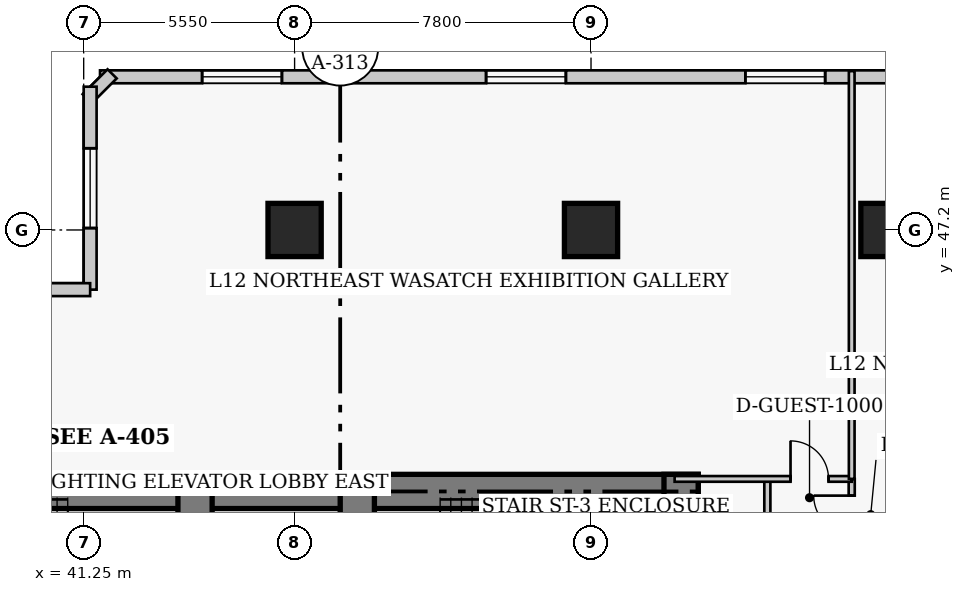
"""IFC4 building model, lengths in metres.
Left out: names, types, materials, properties, quantities, classifications, styles, units other than length and angle.
Written with IfcOpenShell. Run it as: python <this file> out.ifc"""

import sys

from ifc_helpers import new_model, si_unit, direction, frame, frame_2d, origin, origin_2d, place, context, subcontext, project, spatial, rectangle, extrude, element, fill, save


model = new_model("IFC4")
c1 = context("Model", 3, precision=1e-05, world=origin(), true_north=direction((0.0, 1.0)))
c2 = subcontext(c1, "Body", "Model", "MODEL_VIEW")
j1 = project(units=[si_unit("LENGTHUNIT", "METRE"), si_unit("PLANEANGLEUNIT", "RADIAN")], contexts=[c1])
p1 = place(None, origin())
s1 = spatial("IfcSite", under=j1, at=p1, CompositionType="ELEMENT")
p2 = place(p1, origin())
s2 = spatial("IfcBuilding", under=s1, at=p2, CompositionType="ELEMENT")
p3 = place(p2, frame((0.0, 0.0, 52.6)))
s3 = spatial("IfcBuildingStorey", under=s2, at=p3, CompositionType="ELEMENT", Elevation=52.6)
p4 = place(p3, frame((35.85, 40.32, 0.0), z_axis=(0.0, 0.0, 1.0), x_axis=(1.0, 0.0, 0.0)))
e1 = element("IfcWall", 1, at=p4, inside=s3, PredefinedType="SHEAR", context=c2, shape_type="SweptSolid", body=[
    extrude(rectangle(XDim=12.6, YDim=0.9, at=frame_2d((6.3, 0.0))), origin(), (0.0, 0.0, 1.0), 3.8),
])
p5 = place(p3, frame((48.45, 40.32, 0.0), z_axis=(0.0, 0.0, 1.0), x_axis=(1.0, 0.0, 0.0)))
e2 = element("IfcWall", 2, at=p5, inside=s3, PredefinedType="SHEAR", context=c2, shape_type="SweptSolid", body=[
    extrude(rectangle(XDim=8.97, YDim=0.9, at=frame_2d((4.485, 0.0))), origin(), (0.0, 0.0, 1.0), 3.8),
])
p6 = place(p3, frame((56.97, 27.05, 0.0), z_axis=(0.0, 0.0, 1.0), x_axis=(0.0, 1.0, 0.0)))
e3 = element("IfcWall", 3, at=p6, inside=s3, PredefinedType="SHEAR", context=c2, shape_type="SweptSolid", body=[
    extrude(rectangle(XDim=13.72, YDim=0.9, at=frame_2d((6.86, 0.0))), origin(), (0.0, 0.0, 1.0), 3.8),
])
p7 = place(p3, frame((44.18, 36.37, 0.0), z_axis=(0.0, 0.0, 1.0), x_axis=(0.0, 1.0, 0.0)))
e4 = element("IfcWall", 4, at=p7, inside=s3, PredefinedType="SHEAR", context=c2, shape_type="SweptSolid", body=[
    extrude(rectangle(XDim=3.95, YDim=0.9, at=frame_2d((1.975, 0.0))), origin(), (0.0, 0.0, 1.0), 3.8),
])
p8 = place(p3, frame((48.45, 32.3, 0.0), z_axis=(0.0, 0.0, 1.0), x_axis=(0.0, 1.0, 0.0)))
e5 = element("IfcWall", 5, at=p8, inside=s3, PredefinedType="SHEAR", context=c2, shape_type="SweptSolid", body=[
    extrude(rectangle(XDim=8.02, YDim=0.9, at=frame_2d((4.01, 0.0))), origin(), (0.0, 0.0, 1.0), 3.8),
])
p9 = place(p8, frame((5.9, 0.0, 0.0)))
e6 = element("IfcOpeningElement", 6, at=p9, cuts=e5, PredefinedType="OPENING", context=c2, shape_type="SweptSolid", body=[
    extrude(rectangle(XDim=1.1, YDim=2.15, at=frame_2d((0.55, 1.075))), frame((0.0, 0.46, 0.0), z_axis=(0.0, -1.0, 0.0), x_axis=(1.0, 0.0, 0.0)), (0.0, 0.0, 1.0), 0.92),
])
for number, where, z_axis, x_axis in (
    (7, (46.8, 47.2, 0.0), (0.0, 0.0, 1.0), (1.0, 0.0, 0.0)),
    (8, (54.6, 47.2, 0.0), (0.0, 0.0, 1.0), (1.0, 0.0, 0.0)),
    (9, (62.4, 47.2, 0.0), (0.0, 0.0, 1.0), (1.0, 0.0, 0.0)),
):
    element("IfcColumn", number, at=place(p3, frame(where, z_axis=z_axis, x_axis=x_axis)), inside=s3, PredefinedType="COLUMN", context=c2, shape_type="SweptSolid", body=[
        extrude(rectangle(XDim=1.4, YDim=1.4, at=origin_2d()), origin(), (0.0, 0.0, 1.0), 3.8),
    ])
p10 = place(p3, frame((71.57, 51.23, 0.0), z_axis=(0.0, 0.0, 1.0), x_axis=(-1.0, 0.0, 0.0)))
e10 = element("IfcWall", 10, at=p10, inside=s3, PredefinedType="SOLIDWALL", context=c2, shape_type="SweptSolid", body=[
    extrude(rectangle(XDim=29.89, YDim=0.34, at=frame_2d((14.945, 0.0))), origin(), (0.0, 0.0, 1.0), 3.54),
])
p11 = place(p10, frame((2.686, 0.0, 0.85)))
e11 = element("IfcOpeningElement", 11, at=p11, cuts=e10, PredefinedType="OPENING", context=c2, shape_type="SweptSolid", body=[
    extrude(rectangle(XDim=2.1, YDim=1.85, at=frame_2d((1.05, 0.925))), frame((0.0, 0.18, 0.0), z_axis=(0.0, -1.0, 0.0), x_axis=(1.0, 0.0, 0.0)), (0.0, 0.0, 1.0), 0.36),
])
p12 = place(p10, frame((10.809, 0.0, 0.85)))
e12 = element("IfcOpeningElement", 12, at=p12, cuts=e10, PredefinedType="OPENING", context=c2, shape_type="SweptSolid", body=[
    extrude(rectangle(XDim=2.1, YDim=1.85, at=frame_2d((1.05, 0.925))), frame((0.0, 0.18, 0.0), z_axis=(0.0, -1.0, 0.0), x_axis=(1.0, 0.0, 0.0)), (0.0, 0.0, 1.0), 0.36),
])
p13 = place(p10, frame((17.631, 0.0, 0.85)))
e13 = element("IfcOpeningElement", 13, at=p13, cuts=e10, PredefinedType="OPENING", context=c2, shape_type="SweptSolid", body=[
    extrude(rectangle(XDim=2.1, YDim=1.85, at=frame_2d((1.05, 0.925))), frame((0.0, 0.18, 0.0), z_axis=(0.0, -1.0, 0.0), x_axis=(1.0, 0.0, 0.0)), (0.0, 0.0, 1.0), 0.36),
])
p14 = place(p10, frame((25.104, 0.0, 0.85)))
e14 = element("IfcOpeningElement", 14, at=p14, cuts=e10, PredefinedType="OPENING", context=c2, shape_type="SweptSolid", body=[
    extrude(rectangle(XDim=2.1, YDim=1.85, at=frame_2d((1.05, 0.925))), frame((0.0, 0.18, 0.0), z_axis=(0.0, -1.0, 0.0), x_axis=(1.0, 0.0, 0.0)), (0.0, 0.0, 1.0), 0.36),
])
p15 = place(p3, frame((41.999, 51.308, 0.0), z_axis=(0.0, 0.0, 1.0), x_axis=(-0.707238225886, -0.706975312048, 0.0)))
e15 = element("IfcWall", 15, at=p15, inside=s3, PredefinedType="SOLIDWALL", context=c2, shape_type="SweptSolid", body=[
    extrude(rectangle(XDim=0.929, YDim=0.34, at=frame_2d((0.464, 0.0))), origin(), (0.0, 0.0, 1.0), 3.54),
])
p16 = place(p3, frame((41.42, 50.97, 0.0), z_axis=(0.0, 0.0, 1.0), x_axis=(0.0, -1.0, 0.0)))
e16 = element("IfcWall", 16, at=p16, inside=s3, PredefinedType="SOLIDWALL", context=c2, shape_type="SweptSolid", body=[
    extrude(rectangle(XDim=5.34, YDim=0.34, at=frame_2d((2.67, 0.0))), origin(), (0.0, 0.0, 1.0), 3.54),
])
p17 = place(p16, frame((1.62, 0.0, 0.85)))
e17 = element("IfcOpeningElement", 17, at=p17, cuts=e16, PredefinedType="OPENING", context=c2, shape_type="SweptSolid", body=[
    extrude(rectangle(XDim=2.1, YDim=1.85, at=frame_2d((1.05, 0.925))), frame((0.0, 0.18, 0.0), z_axis=(0.0, -1.0, 0.0), x_axis=(1.0, 0.0, 0.0)), (0.0, 0.0, 1.0), 0.36),
])
p18 = place(p3, frame((41.42, 45.63, 0.0), z_axis=(0.0, 0.0, 1.0), x_axis=(-1.0, 0.0, 0.0)))
e18 = element("IfcWall", 18, at=p18, inside=s3, PredefinedType="SOLIDWALL", context=c2, shape_type="SweptSolid", body=[
    extrude(rectangle(XDim=4.84, YDim=0.34, at=frame_2d((2.42, 0.0))), origin(), (0.0, 0.0, 1.0), 3.54),
])
p19 = place(p18, frame((1.37, 0.0, 0.85)))
e19 = element("IfcOpeningElement", 19, at=p19, cuts=e18, PredefinedType="OPENING", context=c2, shape_type="SweptSolid", body=[
    extrude(rectangle(XDim=2.1, YDim=1.85, at=frame_2d((1.05, 0.925))), frame((0.0, 0.18, 0.0), z_axis=(0.0, -1.0, 0.0), x_axis=(1.0, 0.0, 0.0)), (0.0, 0.0, 1.0), 0.36),
])
p20 = place(p3, frame((61.46, 10.25, 0.0), z_axis=(0.0, 0.0, 1.0), x_axis=(0.0, 1.0, 0.0)))
e20 = element("IfcWall", 20, at=p20, inside=s3, PredefinedType="PARTITIONING", context=c2, shape_type="SweptSolid", body=[
    extrude(rectangle(XDim=30.4, YDim=0.16, at=frame_2d((15.2, 0.0))), origin(), (0.0, 0.0, 1.0), 3.54),
])
p21 = place(p20, frame((4.4, 0.0, 0.0)))
e21 = element("IfcOpeningElement", 21, at=p21, cuts=e20, PredefinedType="OPENING", context=c2, shape_type="SweptSolid", body=[
    extrude(rectangle(XDim=0.95, YDim=2.1, at=frame_2d((0.475, 1.05))), frame((0.0, 0.09, 0.0), z_axis=(0.0, -1.0, 0.0), x_axis=(1.0, 0.0, 0.0)), (0.0, 0.0, 1.0), 0.18),
])
p22 = place(p20, frame((13.337, 0.0, 0.0)))
e22 = element("IfcOpeningElement", 22, at=p22, cuts=e20, PredefinedType="OPENING", context=c2, shape_type="SweptSolid", body=[
    extrude(rectangle(XDim=0.95, YDim=2.1, at=frame_2d((0.475, 1.05))), frame((0.0, 0.09, 0.0), z_axis=(0.0, -1.0, 0.0), x_axis=(1.0, 0.0, 0.0)), (0.0, 0.0, 1.0), 0.18),
])
p23 = place(p20, frame((21.462, 0.0, 0.0)))
e23 = element("IfcOpeningElement", 23, at=p23, cuts=e20, PredefinedType="OPENING", context=c2, shape_type="SweptSolid", body=[
    extrude(rectangle(XDim=0.95, YDim=2.1, at=frame_2d((0.475, 1.05))), frame((0.0, 0.09, 0.0), z_axis=(0.0, -1.0, 0.0), x_axis=(1.0, 0.0, 0.0)), (0.0, 0.0, 1.0), 0.18),
])
p24 = place(p20, frame((28.96, 0.0, 0.0)))
e24 = element("IfcOpeningElement", 24, at=p24, cuts=e20, PredefinedType="OPENING", context=c2, shape_type="SweptSolid", body=[
    extrude(rectangle(XDim=1.0, YDim=2.15, at=frame_2d((0.5, 1.075))), frame((0.0, 0.09, 0.0), z_axis=(0.0, -1.0, 0.0), x_axis=(1.0, 0.0, 0.0)), (0.0, 0.0, 1.0), 0.18),
])
p25 = place(p3, frame((59.24, 26.26, 0.0), z_axis=(0.0, 0.0, 1.0), x_axis=(0.0, 1.0, 0.0)))
e25 = element("IfcWall", 25, at=p25, inside=s3, PredefinedType="PARTITIONING", context=c2, shape_type="SweptSolid", body=[
    extrude(rectangle(XDim=14.39, YDim=0.16, at=frame_2d((7.195, 0.0))), origin(), (0.0, 0.0, 1.0), 3.54),
])
p26 = place(p3, frame((56.8, 40.65, 0.0), z_axis=(0.0, 0.0, 1.0), x_axis=(1.0, 0.0, 0.0)))
e26 = element("IfcWall", 26, at=p26, inside=s3, PredefinedType="PARTITIONING", context=c2, shape_type="SweptSolid", body=[
    extrude(rectangle(XDim=4.66, YDim=0.15, at=frame_2d((2.33, 0.0))), origin(), (0.0, 0.0, 1.0), 3.54),
])
p27 = place(p26, frame((3.05, 0.0, 0.0)))
e27 = element("IfcOpeningElement", 27, at=p27, cuts=e26, PredefinedType="OPENING", context=c2, shape_type="SweptSolid", body=[
    extrude(rectangle(XDim=1.0, YDim=2.15, at=frame_2d((0.5, 1.075))), frame((0.0, 0.085, 0.0), z_axis=(0.0, -1.0, 0.0), x_axis=(1.0, 0.0, 0.0)), (0.0, 0.0, 1.0), 0.17),
])
p28 = place(p3, frame((61.46, 40.65, 0.0), z_axis=(0.0, 0.0, 1.0), x_axis=(0.0, 1.0, 0.0)))
e28 = element("IfcWall", 28, at=p28, inside=s3, PredefinedType="PARTITIONING", context=c2, shape_type="SweptSolid", body=[
    extrude(rectangle(XDim=10.73, YDim=0.15, at=frame_2d((5.365, 0.0))), origin(), (0.0, 0.0, 1.0), 3.54),
])
p29 = place(p12, origin())
e29 = element("IfcWindow", 29, at=p29, inside=s3, PartitioningType="SINGLE_PANEL", PredefinedType="WINDOW", context=c2, shape_type="SweptSolid", body=[
    extrude(rectangle(XDim=2.1, YDim=1.85, at=frame_2d((1.05, 0.925))), frame((0.0, 0.03, 0.0), z_axis=(0.0, -1.0, 0.0), x_axis=(1.0, 0.0, 0.0)), (0.0, 0.0, 1.0), 0.06),
])
fill(e12, e29)
p30 = place(p13, origin())
e30 = element("IfcWindow", 30, at=p30, inside=s3, PartitioningType="SINGLE_PANEL", PredefinedType="WINDOW", context=c2, shape_type="SweptSolid", body=[
    extrude(rectangle(XDim=2.1, YDim=1.85, at=frame_2d((1.05, 0.925))), frame((0.0, 0.03, 0.0), z_axis=(0.0, -1.0, 0.0), x_axis=(1.0, 0.0, 0.0)), (0.0, 0.0, 1.0), 0.06),
])
fill(e13, e30)
p31 = place(p14, origin())
e31 = element("IfcWindow", 31, at=p31, inside=s3, PartitioningType="SINGLE_PANEL", PredefinedType="WINDOW", context=c2, shape_type="SweptSolid", body=[
    extrude(rectangle(XDim=2.1, YDim=1.85, at=frame_2d((1.05, 0.925))), frame((0.0, 0.03, 0.0), z_axis=(0.0, -1.0, 0.0), x_axis=(1.0, 0.0, 0.0)), (0.0, 0.0, 1.0), 0.06),
])
fill(e14, e31)
p32 = place(p17, origin())
e32 = element("IfcWindow", 32, at=p32, inside=s3, PartitioningType="SINGLE_PANEL", PredefinedType="WINDOW", context=c2, shape_type="SweptSolid", body=[
    extrude(rectangle(XDim=2.1, YDim=1.85, at=frame_2d((1.05, 0.925))), frame((0.0, 0.03, 0.0), z_axis=(0.0, -1.0, 0.0), x_axis=(1.0, 0.0, 0.0)), (0.0, 0.0, 1.0), 0.06),
])
fill(e17, e32)
p33 = place(p27, origin())
e33 = element("IfcDoor", 33, at=p33, inside=s3, OperationType="SINGLE_SWING_LEFT", PredefinedType="DOOR", context=c2, shape_type="SweptSolid", body=[
    extrude(rectangle(XDim=1.0, YDim=2.15, at=frame_2d((0.5, 1.075))), frame((0.0, 0.025, 0.0), z_axis=(0.0, -1.0, 0.0), x_axis=(1.0, 0.0, 0.0)), (0.0, 0.0, 1.0), 0.05),
])
fill(e27, e33)
p34 = place(p24, origin())
e34 = element("IfcDoor", 34, at=p34, inside=s3, OperationType="SINGLE_SWING_RIGHT", PredefinedType="DOOR", context=c2, shape_type="SweptSolid", body=[
    extrude(rectangle(XDim=1.0, YDim=2.15, at=frame_2d((0.5, 1.075))), frame((0.0, 0.025, 0.0), z_axis=(0.0, -1.0, 0.0), x_axis=(1.0, 0.0, 0.0)), (0.0, 0.0, 1.0), 0.05),
])
fill(e24, e34)
save(model, sys.argv[1])
